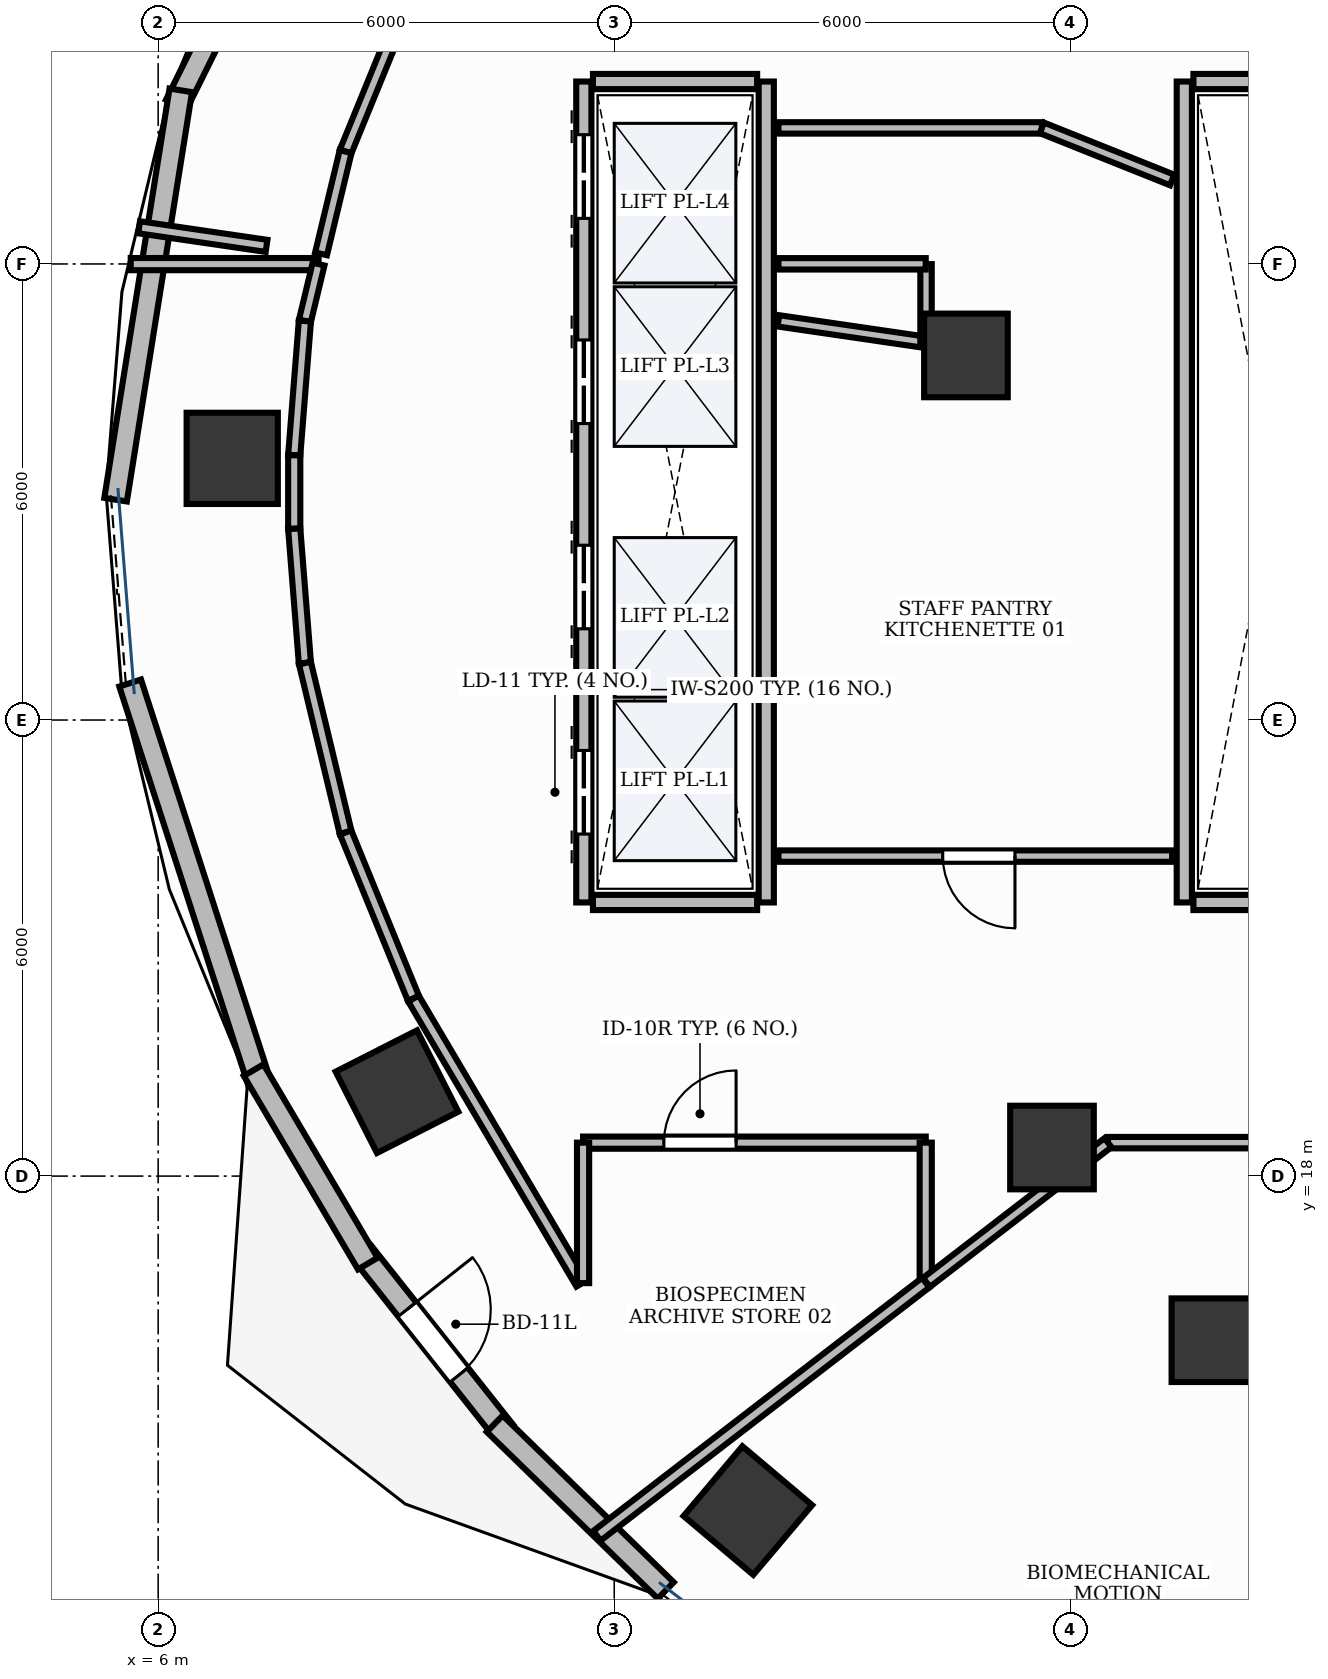
"""IFC4 building model, lengths in metres.
Left out: names, types, materials, properties, quantities, classifications, styles, units other than length and angle.
Written with IfcOpenShell. Run it as: python <this file> out.ifc"""

import sys

from ifc_helpers import new_model, si_unit, direction, frame, frame_2d, origin, origin_2d, place, context, subcontext, project, spatial, rectangle, extrude, element, fill, save


model = new_model("IFC4")
c1 = context("Model", 3, precision=1e-05, world=origin(), true_north=direction((0.0, 1.0)))
c2 = subcontext(c1, "Body", "Model", "MODEL_VIEW")
j1 = project(units=[si_unit("LENGTHUNIT", "METRE"), si_unit("PLANEANGLEUNIT", "RADIAN")], contexts=[c1])
p1 = place(None, origin())
s1 = spatial("IfcSite", under=j1, at=p1, CompositionType="ELEMENT")
p2 = place(p1, origin())
s2 = spatial("IfcBuilding", under=s1, at=p2, CompositionType="ELEMENT")
p3 = place(p2, frame((0.0, 0.0, 115.2)))
s3 = spatial("IfcBuildingStorey", under=s2, at=p3, CompositionType="ELEMENT", Elevation=115.2)
p4 = place(p3, frame((6.974, 27.442, -0.0), z_axis=(0.0, 0.0, 1.0), x_axis=(0.0, 1.0, 0.0)))
e1 = element("IfcColumn", 1, at=p4, inside=s3, PredefinedType="COLUMN", context=c2, shape_type="SweptSolid", body=[
    extrude(rectangle(XDim=1.2, YDim=1.2, at=origin_2d()), origin(), (0.0, 0.0, 1.0), 3.901),
])
p5 = place(p3, frame((16.627, 28.797, -0.0), z_axis=(0.0, 0.0, 1.0), x_axis=(1.0, 0.0, 0.0)))
e2 = element("IfcColumn", 2, at=p5, inside=s3, PredefinedType="COLUMN", context=c2, shape_type="SweptSolid", body=[
    extrude(rectangle(XDim=1.1, YDim=1.1, at=origin_2d()), origin(), (0.0, 0.0, 1.0), 3.901),
])
p6 = place(p3, frame((9.142, 19.111, -0.0), z_axis=(0.0, 0.0, 1.0), x_axis=(-0.453057191132, 0.891481453292, 0.0)))
e3 = element("IfcColumn", 3, at=p6, inside=s3, PredefinedType="COLUMN", context=c2, shape_type="SweptSolid", body=[
    extrude(rectangle(XDim=1.2, YDim=1.2, at=origin_2d()), origin(), (0.0, 0.0, 1.0), 3.901),
])
p7 = place(p3, frame((17.759, 18.376, -0.0), z_axis=(0.0, 0.0, 1.0), x_axis=(1.0, 0.0, 0.0)))
e4 = element("IfcColumn", 4, at=p7, inside=s3, PredefinedType="COLUMN", context=c2, shape_type="SweptSolid", body=[
    extrude(rectangle(XDim=1.1, YDim=1.1, at=origin_2d()), origin(), (0.0, 0.0, 1.0), 3.901),
])
p8 = place(p3, frame((13.758, 13.6, -0.0), z_axis=(0.0, 0.0, 1.0), x_axis=(-0.764246456939, 0.644924300253, 0.0)))
e5 = element("IfcColumn", 5, at=p8, inside=s3, PredefinedType="COLUMN", context=c2, shape_type="SweptSolid", body=[
    extrude(rectangle(XDim=1.2, YDim=1.2, at=origin_2d()), origin(), (0.0, 0.0, 1.0), 3.901),
])
p9 = place(p3, frame((19.883, 15.841, -0.0), z_axis=(0.0, 0.0, 1.0), x_axis=(1.0, 0.0, 0.0)))
e6 = element("IfcColumn", 6, at=p9, inside=s3, PredefinedType="COLUMN", context=c2, shape_type="SweptSolid", body=[
    extrude(rectangle(XDim=1.1, YDim=1.1, at=origin_2d()), origin(), (0.0, 0.0, 1.0), 3.901),
])
p10 = place(p3, frame((8.685, 16.993, 0.0), z_axis=(0.0, 0.0, 1.0), x_axis=(0.620971431761, -0.783833197139, 0.0)))
e7 = element("IfcWall", 7, at=p10, inside=s3, PredefinedType="STANDARD", context=c2, shape_type="SweptSolid", body=[
    extrude(rectangle(XDim=3.004, YDim=0.3, at=frame_2d((1.502, 0.0))), origin(), (0.0, 0.0, 1.0), 3.9),
])
p11 = place(p10, frame((0.952, 0.0, 0.0)))
e8 = element("IfcOpeningElement", 8, at=p11, cuts=e7, PredefinedType="OPENING", context=c2, shape_type="SweptSolid", body=[
    extrude(rectangle(XDim=1.1, YDim=2.15, at=frame_2d((0.55, 1.075))), frame((0.0, 0.165, 0.0), z_axis=(0.0, -1.0, 0.0), x_axis=(1.0, 0.0, 0.0)), (0.0, 0.0, 1.0), 0.33),
])
p12 = place(p3, frame((8.758, 37.163, 0.0), z_axis=(0.0, 0.0, 1.0), x_axis=(-0.445298052399, -0.895382401284, 0.0)))
e9 = element("IfcWall", 9, at=p12, inside=s3, PredefinedType="STANDARD", context=c2, shape_type="SweptSolid", body=[
    extrude(rectangle(XDim=5.662, YDim=0.3, at=frame_2d((2.831, 0.0))), origin(), (0.0, 0.0, 1.0), 3.47),
])
p13 = place(p3, frame((6.297, 32.284, 0.0), z_axis=(0.0, 0.0, 1.0), x_axis=(-0.157279785013, -0.987554084203, 0.0)))
e10 = element("IfcWall", 10, at=p13, inside=s3, PredefinedType="STANDARD", context=c2, shape_type="SweptSolid", body=[
    extrude(rectangle(XDim=5.453, YDim=0.3, at=frame_2d((2.727, 0.0))), origin(), (0.0, 0.0, 1.0), 3.47),
])
p14 = place(p3, frame((5.632, 24.487, 0.0), z_axis=(0.0, 0.0, 1.0), x_axis=(0.307599470659, -0.951515930319, 0.0)))
e11 = element("IfcWall", 11, at=p14, inside=s3, PredefinedType="STANDARD", context=c2, shape_type="SweptSolid", body=[
    extrude(rectangle(XDim=5.534, YDim=0.3, at=frame_2d((2.767, 0.0))), origin(), (0.0, 0.0, 1.0), 3.9),
])
p15 = place(p3, frame((7.256, 19.394, 0.0), z_axis=(0.0, 0.0, 1.0), x_axis=(0.508200342003, -0.861238882302, 0.0)))
e12 = element("IfcWall", 12, at=p15, inside=s3, PredefinedType="STANDARD", context=c2, shape_type="SweptSolid", body=[
    extrude(rectangle(XDim=2.955, YDim=0.3, at=frame_2d((1.478, 0.0))), origin(), (0.0, 0.0, 1.0), 3.9),
])
p16 = place(p3, frame((10.428, 14.742, 0.0), z_axis=(0.0, 0.0, 1.0), x_axis=(0.716101112291, -0.69799655943, 0.0)))
e13 = element("IfcWall", 13, at=p16, inside=s3, PredefinedType="STANDARD", context=c2, shape_type="SweptSolid", body=[
    extrude(rectangle(XDim=3.142, YDim=0.3, at=frame_2d((1.571, 0.0))), origin(), (0.0, 0.0, 1.0), 3.9),
])
p17 = place(p3, frame((11.6, 21.6, 0.0), z_axis=(0.0, 0.0, 1.0), x_axis=(0.0, 1.0, 0.0)))
e14 = element("IfcWall", 14, at=p17, inside=s3, PredefinedType="PARTITIONING", context=c2, shape_type="SweptSolid", body=[
    extrude(rectangle(XDim=10.8, YDim=0.2, at=frame_2d((5.4, 0.0))), origin(), (0.0, 0.0, 1.0), 2.91),
])
p18 = place(p17, frame((0.9, 0.0, 0.0)))
e15 = element("IfcOpeningElement", 15, at=p18, cuts=e14, PredefinedType="OPENING", context=c2, shape_type="SweptSolid", body=[
    extrude(rectangle(XDim=1.1, YDim=2.2, at=frame_2d((0.55, 1.1))), frame((0.0, 0.115, 0.0), z_axis=(0.0, -1.0, 0.0), x_axis=(1.0, 0.0, 0.0)), (0.0, 0.0, 1.0), 0.23),
])
p19 = place(p17, frame((3.6, 0.0, 0.0)))
e16 = element("IfcOpeningElement", 16, at=p19, cuts=e14, PredefinedType="OPENING", context=c2, shape_type="SweptSolid", body=[
    extrude(rectangle(XDim=1.1, YDim=2.2, at=frame_2d((0.55, 1.1))), frame((0.0, 0.115, 0.0), z_axis=(0.0, -1.0, 0.0), x_axis=(1.0, 0.0, 0.0)), (0.0, 0.0, 1.0), 0.23),
])
p20 = place(p17, frame((6.3, 0.0, 0.0)))
e17 = element("IfcOpeningElement", 17, at=p20, cuts=e14, PredefinedType="OPENING", context=c2, shape_type="SweptSolid", body=[
    extrude(rectangle(XDim=1.1, YDim=2.2, at=frame_2d((0.55, 1.1))), frame((0.0, 0.115, 0.0), z_axis=(0.0, -1.0, 0.0), x_axis=(1.0, 0.0, 0.0)), (0.0, 0.0, 1.0), 0.23),
])
p21 = place(p17, frame((9.0, 0.0, 0.0)))
e18 = element("IfcOpeningElement", 18, at=p21, cuts=e14, PredefinedType="OPENING", context=c2, shape_type="SweptSolid", body=[
    extrude(rectangle(XDim=1.1, YDim=2.2, at=frame_2d((0.55, 1.1))), frame((0.0, 0.115, 0.0), z_axis=(0.0, -1.0, 0.0), x_axis=(1.0, 0.0, 0.0)), (0.0, 0.0, 1.0), 0.23),
])
p22 = place(p3, frame((14.0, 21.6, 0.0), z_axis=(0.0, 0.0, 1.0), x_axis=(0.0, 1.0, 0.0)))
e19 = element("IfcWall", 19, at=p22, inside=s3, PredefinedType="PARTITIONING", context=c2, shape_type="SweptSolid", body=[
    extrude(rectangle(XDim=10.8, YDim=0.2, at=frame_2d((5.4, 0.0))), origin(), (0.0, 0.0, 1.0), 2.91),
])
for number, where, z_axis, x_axis in (
    (20, (11.72, 21.6, 0.0), (0.0, 0.0, 1.0), (1.0, 0.0, 0.0)),
    (21, (11.72, 32.4, 0.0), (0.0, 0.0, 1.0), (1.0, 0.0, 0.0)),
):
    element("IfcWall", number, at=place(p3, frame(where, z_axis=z_axis, x_axis=x_axis)), inside=s3, PredefinedType="PARTITIONING", context=c2, shape_type="SweptSolid", body=[
        extrude(rectangle(XDim=2.16, YDim=0.2, at=frame_2d((1.08, 0.0))), origin(), (0.0, 0.0, 1.0), 2.91),
    ])
p23 = place(p3, frame((19.5, 21.6, 0.0), z_axis=(0.0, 0.0, 1.0), x_axis=(0.0, 1.0, 0.0)))
e22 = element("IfcWall", 22, at=p23, inside=s3, PredefinedType="PARTITIONING", context=c2, shape_type="SweptSolid", body=[
    extrude(rectangle(XDim=10.8, YDim=0.2, at=frame_2d((5.4, 0.0))), origin(), (0.0, 0.0, 1.0), 2.91),
])
for number, where, z_axis, x_axis in (
    (23, (19.62, 21.6, 0.0), (0.0, 0.0, 1.0), (1.0, 0.0, 0.0)),
    (24, (19.62, 32.4, 0.0), (0.0, 0.0, 1.0), (1.0, 0.0, 0.0)),
):
    element("IfcWall", number, at=place(p3, frame(where, z_axis=z_axis, x_axis=x_axis)), inside=s3, PredefinedType="PARTITIONING", context=c2, shape_type="SweptSolid", body=[
        extrude(rectangle(XDim=2.11, YDim=0.2, at=frame_2d((1.055, 0.0))), origin(), (0.0, 0.0, 1.0), 2.91),
    ])
p24 = place(p3, frame((19.34, 22.21, 0.0), z_axis=(0.0, 0.0, 1.0), x_axis=(-1.0, 0.0, 0.0)))
e25 = element("IfcWall", 25, at=p24, inside=s3, PredefinedType="PARTITIONING", context=c2, shape_type="SweptSolid", body=[
    extrude(rectangle(XDim=5.18, YDim=0.15, at=frame_2d((2.59, 0.0))), origin(), (0.0, 0.0, 1.0), 2.91),
])
p25 = place(p24, frame((2.068, 0.0, 0.0)))
e26 = element("IfcOpeningElement", 26, at=p25, cuts=e25, PredefinedType="OPENING", context=c2, shape_type="SweptSolid", body=[
    extrude(rectangle(XDim=0.95, YDim=2.15, at=frame_2d((0.475, 1.075))), frame((0.0, 0.09, 0.0), z_axis=(0.0, -1.0, 0.0), x_axis=(1.0, 0.0, 0.0)), (0.0, 0.0, 1.0), 0.18),
])
p26 = place(p3, frame((11.59, 18.44, 0.0), z_axis=(0.0, 0.0, 1.0), x_axis=(1.0, 0.0, 0.0)))
e27 = element("IfcWall", 27, at=p26, inside=s3, PredefinedType="PARTITIONING", context=c2, shape_type="SweptSolid", body=[
    extrude(rectangle(XDim=4.508, YDim=0.16, at=frame_2d((2.254, 0.0))), origin(), (0.0, 0.0, 1.0), 2.91),
])
p27 = place(p26, frame((1.063, 0.0, 0.0)))
e28 = element("IfcOpeningElement", 28, at=p27, cuts=e27, PredefinedType="OPENING", context=c2, shape_type="SweptSolid", body=[
    extrude(rectangle(XDim=0.95, YDim=2.15, at=frame_2d((0.475, 1.075))), frame((0.0, 0.095, 0.0), z_axis=(0.0, -1.0, 0.0), x_axis=(1.0, 0.0, 0.0)), (0.0, 0.0, 1.0), 0.19),
])
p28 = place(p3, frame((14.16, 29.251, 0.0), z_axis=(0.0, 0.0, 1.0), x_axis=(0.989536319699, -0.144283997718, 0.0)))
e29 = element("IfcWall", 29, at=p28, inside=s3, PredefinedType="PARTITIONING", context=c2, shape_type="SweptSolid", body=[
    extrude(rectangle(XDim=1.958, YDim=0.15, at=frame_2d((0.979, 0.0))), origin(), (0.0, 0.0, 1.0), 2.91),
])
p29 = place(p3, frame((16.102, 28.973, 0.0), z_axis=(0.0, 0.0, 1.0), x_axis=(0.0, 1.0, 0.0)))
e30 = element("IfcWall", 30, at=p29, inside=s3, PredefinedType="PARTITIONING", context=c2, shape_type="SweptSolid", body=[
    extrude(rectangle(XDim=1.025, YDim=0.15, at=frame_2d((0.512, 0.0))), origin(), (0.0, 0.0, 1.0), 2.91),
])
p30 = place(p3, frame((16.098, 30.002, 0.0), z_axis=(0.0, 0.0, 1.0), x_axis=(-1.0, 0.0, 0.0)))
e31 = element("IfcWall", 31, at=p30, inside=s3, PredefinedType="PARTITIONING", context=c2, shape_type="SweptSolid", body=[
    extrude(rectangle(XDim=1.938, YDim=0.15, at=frame_2d((0.969, 0.0))), origin(), (0.0, 0.0, 1.0), 2.91),
])
p31 = place(p3, frame((14.16, 31.79, 0.0), z_axis=(0.0, 0.0, 1.0), x_axis=(1.0, 0.0, 0.0)))
e32 = element("IfcWall", 32, at=p31, inside=s3, PredefinedType="PARTITIONING", context=c2, shape_type="SweptSolid", body=[
    extrude(rectangle(XDim=3.467, YDim=0.15, at=frame_2d((1.733, 0.0))), origin(), (0.0, 0.0, 1.0), 2.91),
])
p32 = place(p3, frame((17.626, 31.79, 0.0), z_axis=(0.0, 0.0, 1.0), x_axis=(0.928485814786, -0.371367865789, 0.0)))
e33 = element("IfcWall", 33, at=p32, inside=s3, PredefinedType="PARTITIONING", context=c2, shape_type="SweptSolid", body=[
    extrude(rectangle(XDim=1.845, YDim=0.15, at=frame_2d((0.923, 0.0))), origin(), (0.0, 0.0, 1.0), 2.91),
])
p33 = place(p3, frame((5.639, 29.998, 0.0), z_axis=(0.0, 0.0, 1.0), x_axis=(1.0, 0.0, 0.0)))
e34 = element("IfcWall", 34, at=p33, inside=s3, PredefinedType="PARTITIONING", context=c2, shape_type="SweptSolid", body=[
    extrude(rectangle(XDim=2.471, YDim=0.16, at=frame_2d((1.236, 0.0))), origin(), (0.0, 0.0, 1.0), 2.91),
])
p34 = place(p3, frame((8.11, 29.998, 0.0), z_axis=(0.0, 0.0, 1.0), x_axis=(-0.233781391942, -0.972289185779, 0.0)))
e35 = element("IfcWall", 35, at=p34, inside=s3, PredefinedType="PARTITIONING", context=c2, shape_type="SweptSolid", body=[
    extrude(rectangle(XDim=0.769, YDim=0.16, at=frame_2d((0.384, 0.0))), origin(), (0.0, 0.0, 1.0), 2.91),
])
p35 = place(p3, frame((7.93, 29.249, 0.0), z_axis=(0.0, 0.0, 1.0), x_axis=(-0.079131522864, -0.996864184375, 0.0)))
e36 = element("IfcWall", 36, at=p35, inside=s3, PredefinedType="PARTITIONING", context=c2, shape_type="SweptSolid", body=[
    extrude(rectangle(XDim=1.771, YDim=0.16, at=frame_2d((0.885, 0.0))), origin(), (0.0, 0.0, 1.0), 2.91),
])
p36 = place(p3, frame((7.79, 27.483, 0.0), z_axis=(0.0, 0.0, 1.0), x_axis=(0.0, -1.0, 0.0)))
e37 = element("IfcWall", 37, at=p36, inside=s3, PredefinedType="PARTITIONING", context=c2, shape_type="SweptSolid", body=[
    extrude(rectangle(XDim=0.966, YDim=0.16, at=frame_2d((0.483, 0.0))), origin(), (0.0, 0.0, 1.0), 2.91),
])
p37 = place(p3, frame((7.79, 26.516, 0.0), z_axis=(0.0, 0.0, 1.0), x_axis=(0.079131522864, -0.996864184375, 0.0)))
e38 = element("IfcWall", 38, at=p37, inside=s3, PredefinedType="PARTITIONING", context=c2, shape_type="SweptSolid", body=[
    extrude(rectangle(XDim=1.771, YDim=0.16, at=frame_2d((0.885, 0.0))), origin(), (0.0, 0.0, 1.0), 2.91),
])
p38 = place(p3, frame((7.93, 24.749, 0.0), z_axis=(0.0, 0.0, 1.0), x_axis=(0.233675196412, -0.972314713754, 0.0)))
e39 = element("IfcWall", 39, at=p38, inside=s3, PredefinedType="PARTITIONING", context=c2, shape_type="SweptSolid", body=[
    extrude(rectangle(XDim=2.291, YDim=0.16, at=frame_2d((1.146, 0.0))), origin(), (0.0, 0.0, 1.0), 2.91),
])
p39 = place(p3, frame((8.466, 22.52, 0.0), z_axis=(0.0, 0.0, 1.0), x_axis=(0.378306283753, -0.925680482495, 0.0)))
e40 = element("IfcWall", 40, at=p39, inside=s3, PredefinedType="PARTITIONING", context=c2, shape_type="SweptSolid", body=[
    extrude(rectangle(XDim=2.358, YDim=0.16, at=frame_2d((1.179, 0.0))), origin(), (0.0, 0.0, 1.0), 2.91),
])
p40 = place(p3, frame((9.359, 20.336, 0.0), z_axis=(0.0, 0.0, 1.0), x_axis=(0.508164254342, -0.86126017591, 0.0)))
e41 = element("IfcWall", 41, at=p40, inside=s3, PredefinedType="PARTITIONING", context=c2, shape_type="SweptSolid", body=[
    extrude(rectangle(XDim=4.353, YDim=0.16, at=frame_2d((2.177, 0.0))), origin(), (0.0, 0.0, 1.0), 2.91),
])
p41 = place(p3, frame((11.59, 16.592, 0.0), z_axis=(0.0, 0.0, 1.0), x_axis=(0.0, 1.0, 0.0)))
e42 = element("IfcWall", 42, at=p41, inside=s3, PredefinedType="PARTITIONING", context=c2, shape_type="SweptSolid", body=[
    extrude(rectangle(XDim=1.848, YDim=0.16, at=frame_2d((0.924, 0.0))), origin(), (0.0, 0.0, 1.0), 2.91),
])
p42 = place(p3, frame((16.098, 18.44, 0.0), z_axis=(0.0, 0.0, 1.0), x_axis=(0.0, -1.0, 0.0)))
e43 = element("IfcWall", 43, at=p42, inside=s3, PredefinedType="PARTITIONING", context=c2, shape_type="SweptSolid", body=[
    extrude(rectangle(XDim=1.841, YDim=0.16, at=frame_2d((0.92, 0.0))), origin(), (0.0, 0.0, 1.0), 2.91),
])
p43 = place(p3, frame((16.098, 16.599, 0.0), z_axis=(0.0, 0.0, 1.0), x_axis=(-0.792293030169, -0.610140766008, 0.0)))
e44 = element("IfcWall", 44, at=p43, inside=s3, PredefinedType="PARTITIONING", context=c2, shape_type="SweptSolid", body=[
    extrude(rectangle(XDim=5.459, YDim=0.16, at=frame_2d((2.729, 0.0))), origin(), (0.0, 0.0, 1.0), 2.91),
])
p44 = place(p3, frame((18.496, 18.44, 0.0), z_axis=(0.0, 0.0, 1.0), x_axis=(1.0, 0.0, 0.0)))
e45 = element("IfcWall", 45, at=p44, inside=s3, PredefinedType="PARTITIONING", context=c2, shape_type="SweptSolid", body=[
    extrude(rectangle(XDim=3.294, YDim=0.15, at=frame_2d((1.647, 0.0))), origin(), (0.0, 0.0, 1.0), 2.91),
])
p45 = place(p3, frame((16.108, 16.601, 0.0), z_axis=(0.0, 0.0, 1.0), x_axis=(0.792313685483, 0.61011394329, 0.0)))
e46 = element("IfcWall", 46, at=p45, inside=s3, PredefinedType="PARTITIONING", context=c2, shape_type="SweptSolid", body=[
    extrude(rectangle(XDim=3.014, YDim=0.15, at=frame_2d((1.507, 0.0))), origin(), (0.0, 0.0, 1.0), 2.91),
])
p46 = place(p3, frame((9.358, 33.663, 0.0), z_axis=(0.0, 0.0, 1.0), x_axis=(-0.378306283753, -0.925680482495, 0.0)))
e47 = element("IfcWall", 47, at=p46, inside=s3, PredefinedType="PARTITIONING", context=c2, shape_type="SweptSolid", body=[
    extrude(rectangle(XDim=2.358, YDim=0.16, at=frame_2d((1.179, 0.0))), origin(), (0.0, 0.0, 1.0), 2.91),
])
p47 = place(p3, frame((8.466, 31.479, 0.0), z_axis=(0.0, 0.0, 1.0), x_axis=(-0.233639910683, -0.972323193252, 0.0)))
e48 = element("IfcWall", 48, at=p47, inside=s3, PredefinedType="PARTITIONING", context=c2, shape_type="SweptSolid", body=[
    extrude(rectangle(XDim=1.384, YDim=0.16, at=frame_2d((0.692, 0.0))), origin(), (0.0, 0.0, 1.0), 2.91),
])
p48 = place(p3, frame((7.426, 30.238, 0.0), z_axis=(0.0, 0.0, 1.0), x_axis=(-0.989524406919, 0.144365674976, 0.0)))
e49 = element("IfcWall", 49, at=p48, inside=s3, PredefinedType="PARTITIONING", context=c2, shape_type="SweptSolid", body=[
    extrude(rectangle(XDim=1.695, YDim=0.16, at=frame_2d((0.847, 0.0))), origin(), (0.0, 0.0, 1.0), 2.91),
])
p49 = place(p11, origin())
e50 = element("IfcDoor", 50, at=p49, inside=s3, OperationType="SINGLE_SWING_LEFT", PredefinedType="DOOR", context=c2, shape_type="SweptSolid", body=[
    extrude(rectangle(XDim=1.1, YDim=2.15, at=frame_2d((0.55, 1.075))), frame((0.0, 0.025, 0.0), z_axis=(0.0, -1.0, 0.0), x_axis=(1.0, 0.0, 0.0)), (0.0, 0.0, 1.0), 0.05),
])
fill(e8, e50)
p50 = place(p18, origin())
e51 = element("IfcDoor", 51, at=p50, inside=s3, OperationType="DOUBLE_DOOR_SLIDING", PredefinedType="DOOR", context=c2, shape_type="SweptSolid", body=[
    extrude(rectangle(XDim=1.1, YDim=2.2, at=frame_2d((0.55, 1.1))), frame((0.0, 0.025, 0.0), z_axis=(0.0, -1.0, 0.0), x_axis=(1.0, 0.0, 0.0)), (0.0, 0.0, 1.0), 0.05),
])
fill(e15, e51)
p51 = place(p19, origin())
e52 = element("IfcDoor", 52, at=p51, inside=s3, OperationType="DOUBLE_DOOR_SLIDING", PredefinedType="DOOR", context=c2, shape_type="SweptSolid", body=[
    extrude(rectangle(XDim=1.1, YDim=2.2, at=frame_2d((0.55, 1.1))), frame((0.0, 0.025, 0.0), z_axis=(0.0, -1.0, 0.0), x_axis=(1.0, 0.0, 0.0)), (0.0, 0.0, 1.0), 0.05),
])
fill(e16, e52)
p52 = place(p20, origin())
e53 = element("IfcDoor", 53, at=p52, inside=s3, OperationType="DOUBLE_DOOR_SLIDING", PredefinedType="DOOR", context=c2, shape_type="SweptSolid", body=[
    extrude(rectangle(XDim=1.1, YDim=2.2, at=frame_2d((0.55, 1.1))), frame((0.0, 0.025, 0.0), z_axis=(0.0, -1.0, 0.0), x_axis=(1.0, 0.0, 0.0)), (0.0, 0.0, 1.0), 0.05),
])
fill(e17, e53)
p53 = place(p21, origin())
e54 = element("IfcDoor", 54, at=p53, inside=s3, OperationType="DOUBLE_DOOR_SLIDING", PredefinedType="DOOR", context=c2, shape_type="SweptSolid", body=[
    extrude(rectangle(XDim=1.1, YDim=2.2, at=frame_2d((0.55, 1.1))), frame((0.0, 0.025, 0.0), z_axis=(0.0, -1.0, 0.0), x_axis=(1.0, 0.0, 0.0)), (0.0, 0.0, 1.0), 0.05),
])
fill(e18, e54)
p54 = place(p25, origin())
e55 = element("IfcDoor", 55, at=p54, inside=s3, OperationType="SINGLE_SWING_LEFT", PredefinedType="DOOR", context=c2, shape_type="SweptSolid", body=[
    extrude(rectangle(XDim=0.95, YDim=2.15, at=frame_2d((0.475, 1.075))), frame((0.0, 0.025, 0.0), z_axis=(0.0, -1.0, 0.0), x_axis=(1.0, 0.0, 0.0)), (0.0, 0.0, 1.0), 0.05),
])
fill(e26, e55)
p55 = place(p27, origin())
e56 = element("IfcDoor", 56, at=p55, inside=s3, OperationType="SINGLE_SWING_RIGHT", PredefinedType="DOOR", context=c2, shape_type="SweptSolid", body=[
    extrude(rectangle(XDim=0.95, YDim=2.15, at=frame_2d((0.475, 1.075))), frame((0.0, 0.025, 0.0), z_axis=(0.0, -1.0, 0.0), x_axis=(1.0, 0.0, 0.0)), (0.0, 0.0, 1.0), 0.05),
])
fill(e28, e56)
save(model, sys.argv[1])
